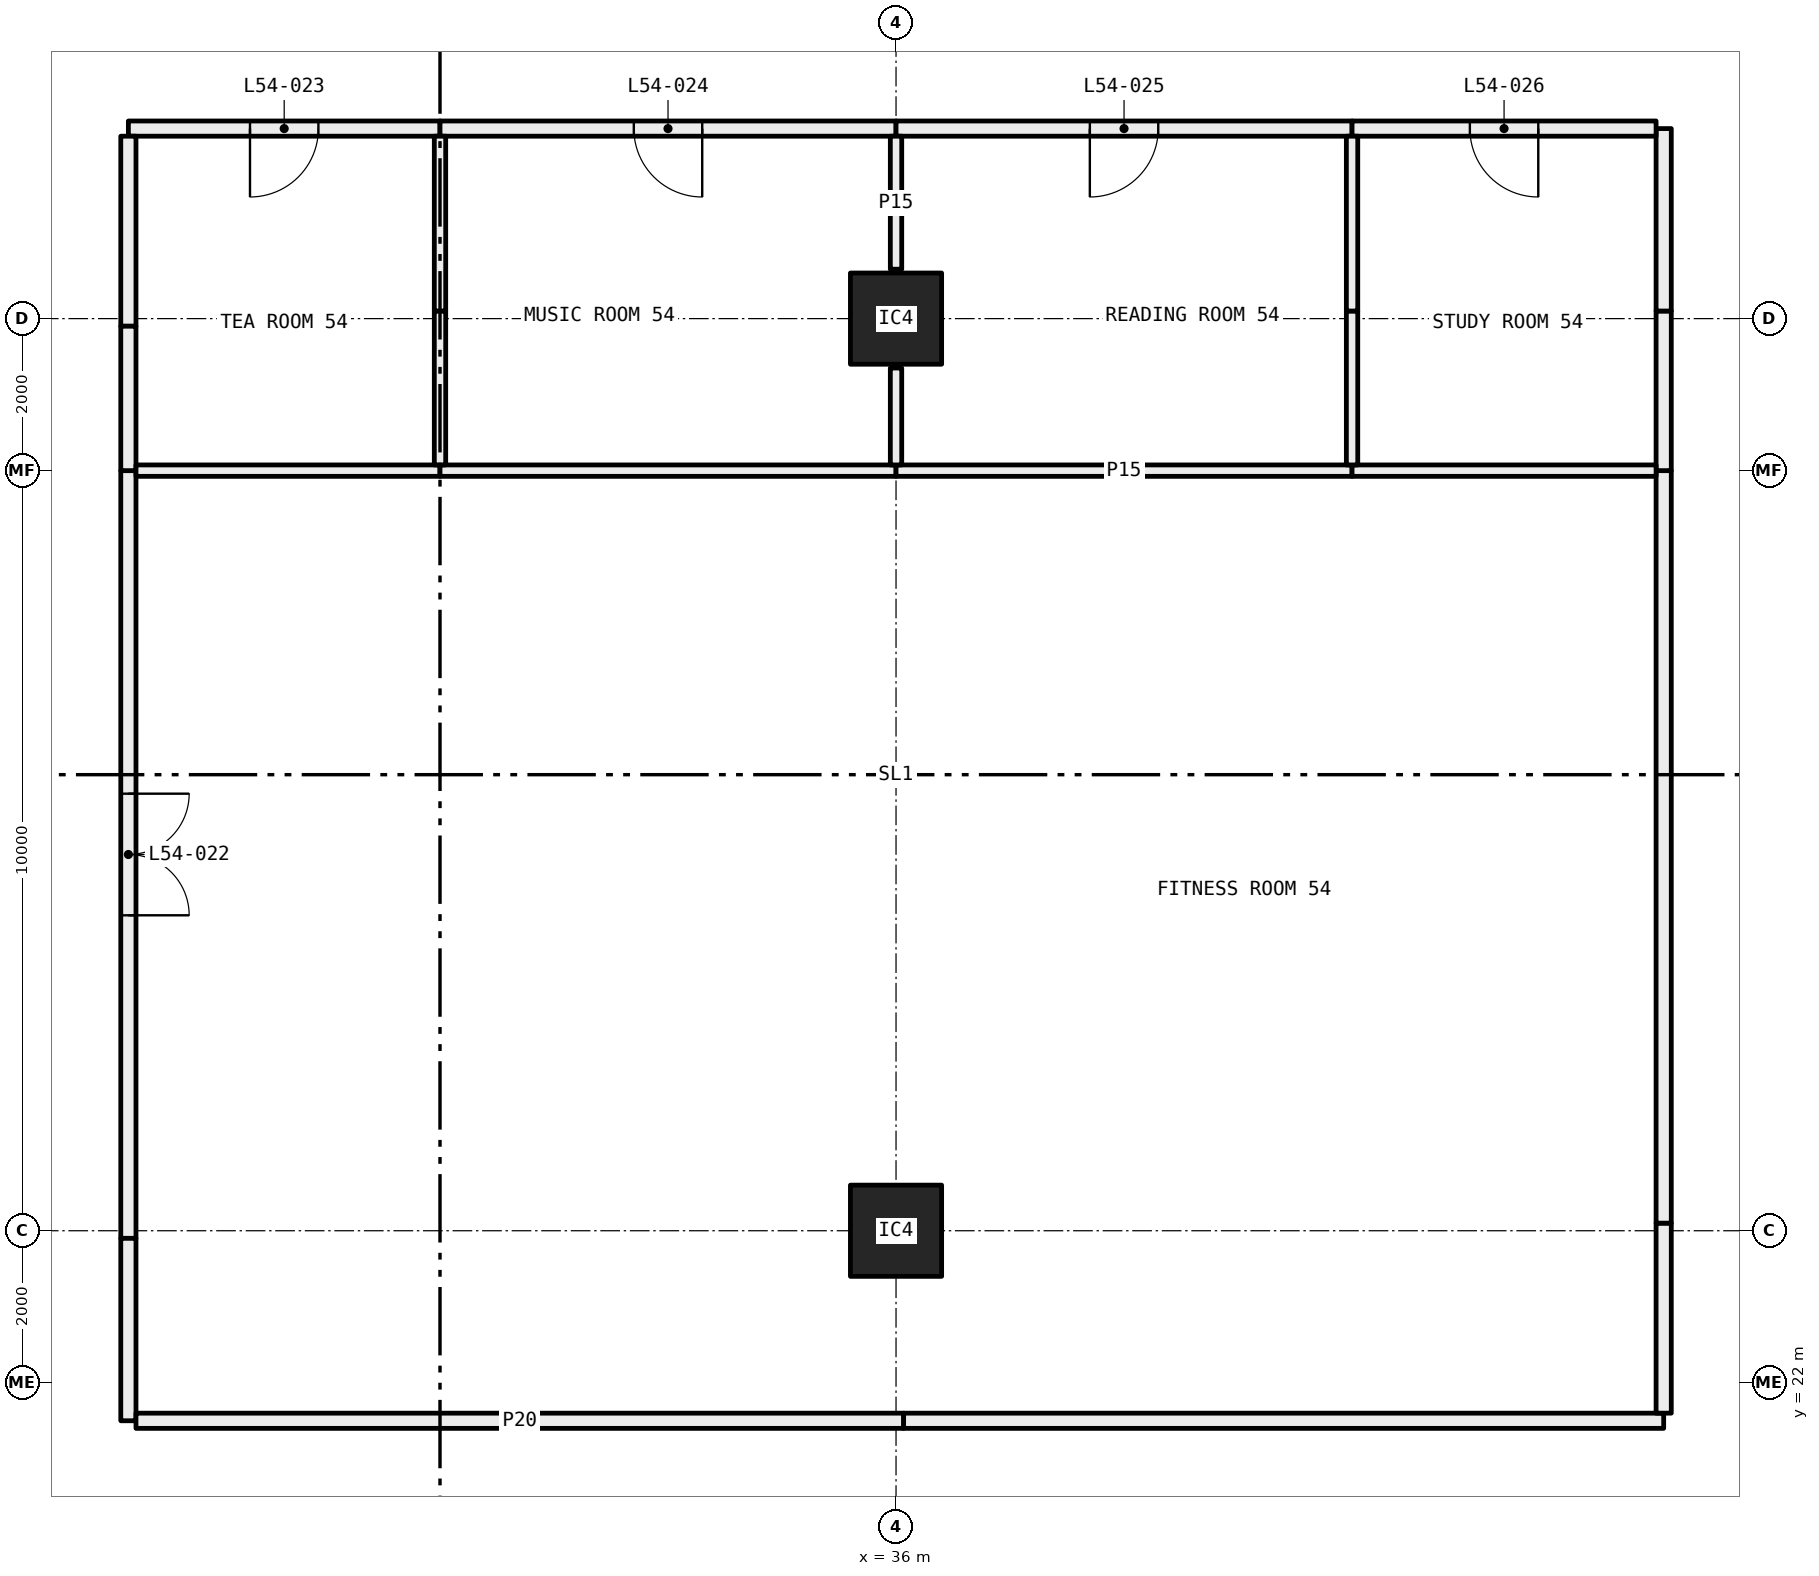
"""IFC4 building model, lengths in metres.
Left out: names, types, materials, properties, quantities, classifications, styles, units other than length and angle.
Written with IfcOpenShell. Run it as: python <this file> out.ifc"""

import sys

from ifc_helpers import new_model, si_unit, direction, frame, frame_2d, origin, origin_2d, place, context, subcontext, project, spatial, rectangle, hollow_rectangle, extrude, element, fill, save


model = new_model("IFC4")
c1 = context("Model", 3, precision=1e-05, world=origin(), true_north=direction((0.0, 1.0)))
c2 = subcontext(c1, "Body", "Model", "MODEL_VIEW")
j1 = project(units=[si_unit("LENGTHUNIT", "METRE"), si_unit("PLANEANGLEUNIT", "RADIAN")], contexts=[c1])
p1 = place(None, origin())
s1 = spatial("IfcSite", under=j1, at=p1, CompositionType="ELEMENT")
p2 = place(p1, origin())
s2 = spatial("IfcBuilding", under=s1, at=p2, CompositionType="ELEMENT")
p3 = place(p2, frame((0.0, 0.0, 203.1)))
s3 = spatial("IfcBuildingStorey", under=s2, at=p3, CompositionType="ELEMENT", Elevation=203.1)
for number, where, z_axis, x_axis in (
    (1, (36.0, 24.0, 0.0), (0.0, 0.0, 1.0), (1.0, 0.0, 0.0)),
    (2, (36.0, 36.0, 0.0), (0.0, 0.0, 1.0), (1.0, 0.0, 0.0)),
):
    element("IfcColumn", number, at=place(p3, frame(where, z_axis=z_axis, x_axis=x_axis)), inside=s3, PredefinedType="COLUMN", context=c2, shape_type="SweptSolid", body=[
        extrude(hollow_rectangle(XDim=1.2, YDim=1.2, WallThickness=0.05, at=origin_2d()), origin(), (0.0, 0.0, 1.0), 3.05),
    ])
p4 = place(p3, frame((25.9, 34.0, 0.0), z_axis=(0.0, 0.0, 1.0), x_axis=(0.0, -1.0, 0.0)))
e3 = element("IfcWall", 3, at=p4, inside=s3, PredefinedType="PARTITIONING", context=c2, shape_type="SweptSolid", body=[
    extrude(rectangle(XDim=10.1, YDim=0.2, at=frame_2d((5.05, 0.0))), origin(), (0.0, 0.0, 1.0), 2.45),
])
p5 = place(p4, frame((4.25, 0.0, 0.0)))
e4 = element("IfcOpeningElement", 4, at=p5, cuts=e3, PredefinedType="OPENING", context=c2, shape_type="SweptSolid", body=[
    extrude(rectangle(XDim=1.6, YDim=2.1, at=frame_2d((0.8, 1.05))), frame((0.0, 0.11, 0.0), z_axis=(0.0, -1.0, 0.0), x_axis=(1.0, 0.0, 0.0)), (0.0, 0.0, 1.0), 0.22),
])
p6 = place(p3, frame((25.9, 23.9, 0.0), z_axis=(0.0, 0.0, 1.0), x_axis=(0.0, -1.0, 0.0)))
e5 = element("IfcWall", 5, at=p6, inside=s3, PredefinedType="PARTITIONING", context=c2, shape_type="SweptSolid", body=[
    extrude(rectangle(XDim=2.4, YDim=0.2, at=frame_2d((1.2, 0.0))), origin(), (0.0, 0.0, 1.0), 3.05),
])
p7 = place(p3, frame((26.0, 21.5, 0.0), z_axis=(0.0, 0.0, 1.0), x_axis=(1.0, 0.0, 0.0)))
e6 = element("IfcWall", 6, at=p7, inside=s3, PredefinedType="PARTITIONING", context=c2, shape_type="SweptSolid", body=[
    extrude(rectangle(XDim=10.1, YDim=0.2, at=frame_2d((5.05, 0.0))), origin(), (0.0, 0.0, 1.0), 2.45),
])
p8 = place(p3, frame((36.1, 21.5, 0.0), z_axis=(0.0, 0.0, 1.0), x_axis=(1.0, 0.0, 0.0)))
e7 = element("IfcWall", 7, at=p8, inside=s3, PredefinedType="PARTITIONING", context=c2, shape_type="SweptSolid", body=[
    extrude(rectangle(XDim=10.0, YDim=0.2, at=frame_2d((5.0, 0.0))), origin(), (0.0, 0.0, 1.0), 3.05),
])
p9 = place(p3, frame((46.1, 21.6, 0.0), z_axis=(0.0, 0.0, 1.0), x_axis=(0.0, 1.0, 0.0)))
e8 = element("IfcWall", 8, at=p9, inside=s3, PredefinedType="PARTITIONING", context=c2, shape_type="SweptSolid", body=[
    extrude(rectangle(XDim=2.5, YDim=0.2, at=frame_2d((1.25, 0.0))), origin(), (0.0, 0.0, 1.0), 2.45),
])
p10 = place(p3, frame((46.1, 24.1, 0.0), z_axis=(0.0, 0.0, 1.0), x_axis=(0.0, 1.0, 0.0)))
e9 = element("IfcWall", 9, at=p10, inside=s3, PredefinedType="PARTITIONING", context=c2, shape_type="SweptSolid", body=[
    extrude(rectangle(XDim=9.9, YDim=0.2, at=frame_2d((4.95, 0.0))), origin(), (0.0, 0.0, 1.0), 3.05),
])
p11 = place(p3, frame((30.0, 38.5, 0.0), z_axis=(0.0, 0.0, 1.0), x_axis=(-1.0, 0.0, 0.0)))
e10 = element("IfcWall", 10, at=p11, inside=s3, PredefinedType="PARTITIONING", context=c2, shape_type="SweptSolid", body=[
    extrude(rectangle(XDim=4.1, YDim=0.2, at=frame_2d((2.05, 0.0))), origin(), (0.0, 0.0, 1.0), 3.05),
])
p12 = place(p11, frame((1.6, 0.0, 0.0)))
e11 = element("IfcOpeningElement", 11, at=p12, cuts=e10, PredefinedType="OPENING", context=c2, shape_type="SweptSolid", body=[
    extrude(rectangle(XDim=0.9, YDim=2.1, at=frame_2d((0.45, 1.05))), frame((0.0, 0.11, 0.0), z_axis=(0.0, -1.0, 0.0), x_axis=(1.0, 0.0, 0.0)), (0.0, 0.0, 1.0), 0.22),
])
p13 = place(p3, frame((25.9, 38.4, 0.0), z_axis=(0.0, 0.0, 1.0), x_axis=(0.0, -1.0, 0.0)))
e12 = element("IfcWall", 12, at=p13, inside=s3, PredefinedType="PARTITIONING", context=c2, shape_type="SweptSolid", body=[
    extrude(rectangle(XDim=2.5, YDim=0.2, at=frame_2d((1.25, 0.0))), origin(), (0.0, 0.0, 1.0), 2.45),
])
p14 = place(p3, frame((25.9, 35.9, 0.0), z_axis=(0.0, 0.0, 1.0), x_axis=(0.0, -1.0, 0.0)))
e13 = element("IfcWall", 13, at=p14, inside=s3, PredefinedType="PARTITIONING", context=c2, shape_type="SweptSolid", body=[
    extrude(rectangle(XDim=1.9, YDim=0.2, at=frame_2d((0.95, 0.0))), origin(), (0.0, 0.0, 1.0), 3.05),
])
p15 = place(p3, frame((36.0, 38.5, 0.0), z_axis=(0.0, 0.0, 1.0), x_axis=(-1.0, 0.0, 0.0)))
e14 = element("IfcWall", 14, at=p15, inside=s3, PredefinedType="PARTITIONING", context=c2, shape_type="SweptSolid", body=[
    extrude(rectangle(XDim=6.0, YDim=0.2, at=frame_2d((3.0, 0.0))), origin(), (0.0, 0.0, 1.0), 2.45),
])
p16 = place(p15, frame((2.55, 0.0, 0.0)))
e15 = element("IfcOpeningElement", 15, at=p16, cuts=e14, PredefinedType="OPENING", context=c2, shape_type="SweptSolid", body=[
    extrude(rectangle(XDim=0.9, YDim=2.1, at=frame_2d((0.45, 1.05))), frame((0.0, 0.11, 0.0), z_axis=(0.0, -1.0, 0.0), x_axis=(1.0, 0.0, 0.0)), (0.0, 0.0, 1.0), 0.22),
])
p17 = place(p3, frame((42.0, 38.5, 0.0), z_axis=(0.0, 0.0, 1.0), x_axis=(-1.0, 0.0, 0.0)))
e16 = element("IfcWall", 16, at=p17, inside=s3, PredefinedType="PARTITIONING", context=c2, shape_type="SweptSolid", body=[
    extrude(rectangle(XDim=6.0, YDim=0.2, at=frame_2d((3.0, 0.0))), origin(), (0.0, 0.0, 1.0), 2.45),
])
p18 = place(p17, frame((2.55, 0.0, 0.0)))
e17 = element("IfcOpeningElement", 17, at=p18, cuts=e16, PredefinedType="OPENING", context=c2, shape_type="SweptSolid", body=[
    extrude(rectangle(XDim=0.9, YDim=2.1, at=frame_2d((0.45, 1.05))), frame((0.0, 0.11, 0.0), z_axis=(0.0, -1.0, 0.0), x_axis=(1.0, 0.0, 0.0)), (0.0, 0.0, 1.0), 0.22),
])
p19 = place(p3, frame((46.1, 34.0, 0.0), z_axis=(0.0, 0.0, 1.0), x_axis=(0.0, 1.0, 0.0)))
e18 = element("IfcWall", 18, at=p19, inside=s3, PredefinedType="PARTITIONING", context=c2, shape_type="SweptSolid", body=[
    extrude(rectangle(XDim=2.1, YDim=0.2, at=frame_2d((1.05, 0.0))), origin(), (0.0, 0.0, 1.0), 2.45),
])
p20 = place(p3, frame((46.1, 36.1, 0.0), z_axis=(0.0, 0.0, 1.0), x_axis=(0.0, 1.0, 0.0)))
e19 = element("IfcWall", 19, at=p20, inside=s3, PredefinedType="PARTITIONING", context=c2, shape_type="SweptSolid", body=[
    extrude(rectangle(XDim=2.4, YDim=0.2, at=frame_2d((1.2, 0.0))), origin(), (0.0, 0.0, 1.0), 3.05),
])
p21 = place(p3, frame((46.0, 38.5, 0.0), z_axis=(0.0, 0.0, 1.0), x_axis=(-1.0, 0.0, 0.0)))
e20 = element("IfcWall", 20, at=p21, inside=s3, PredefinedType="PARTITIONING", context=c2, shape_type="SweptSolid", body=[
    extrude(rectangle(XDim=4.0, YDim=0.2, at=frame_2d((2.0, 0.0))), origin(), (0.0, 0.0, 1.0), 3.05),
])
p22 = place(p21, frame((1.55, 0.0, 0.0)))
e21 = element("IfcOpeningElement", 21, at=p22, cuts=e20, PredefinedType="OPENING", context=c2, shape_type="SweptSolid", body=[
    extrude(rectangle(XDim=0.9, YDim=2.1, at=frame_2d((0.45, 1.05))), frame((0.0, 0.11, 0.0), z_axis=(0.0, -1.0, 0.0), x_axis=(1.0, 0.0, 0.0)), (0.0, 0.0, 1.0), 0.22),
])
p23 = place(p3, frame((30.0, 34.0, 0.0), z_axis=(0.0, 0.0, 1.0), x_axis=(-1.0, 0.0, 0.0)))
e22 = element("IfcWall", 22, at=p23, inside=s3, PredefinedType="PARTITIONING", context=c2, shape_type="SweptSolid", body=[
    extrude(rectangle(XDim=4.0, YDim=0.15, at=frame_2d((2.0, 0.0))), origin(), (0.0, 0.0, 1.0), 3.05),
])
for number, where, z_axis, x_axis in (
    (23, (36.0, 34.0, 0.0), (0.0, 0.0, 1.0), (-1.0, 0.0, 0.0)),
    (24, (42.0, 34.0, 0.0), (0.0, 0.0, 1.0), (-1.0, 0.0, 0.0)),
):
    element("IfcWall", number, at=place(p3, frame(where, z_axis=z_axis, x_axis=x_axis)), inside=s3, PredefinedType="PARTITIONING", context=c2, shape_type="SweptSolid", body=[
        extrude(rectangle(XDim=6.0, YDim=0.15, at=frame_2d((3.0, 0.0))), origin(), (0.0, 0.0, 1.0), 2.45),
    ])
p24 = place(p3, frame((46.0, 34.0, 0.0), z_axis=(0.0, 0.0, 1.0), x_axis=(-1.0, 0.0, 0.0)))
e25 = element("IfcWall", 25, at=p24, inside=s3, PredefinedType="PARTITIONING", context=c2, shape_type="SweptSolid", body=[
    extrude(rectangle(XDim=4.0, YDim=0.15, at=frame_2d((2.0, 0.0))), origin(), (0.0, 0.0, 1.0), 3.05),
])
p25 = place(p3, frame((30.0, 34.075, 0.0), z_axis=(0.0, 0.0, 1.0), x_axis=(0.0, 1.0, 0.0)))
e26 = element("IfcWall", 26, at=p25, inside=s3, PredefinedType="PARTITIONING", context=c2, shape_type="SweptSolid", body=[
    extrude(rectangle(XDim=2.025, YDim=0.15, at=frame_2d((1.013, 0.0))), origin(), (0.0, 0.0, 1.0), 2.45),
])
p26 = place(p3, frame((30.0, 36.1, 0.0), z_axis=(0.0, 0.0, 1.0), x_axis=(0.0, 1.0, 0.0)))
e27 = element("IfcWall", 27, at=p26, inside=s3, PredefinedType="PARTITIONING", context=c2, shape_type="SweptSolid", body=[
    extrude(rectangle(XDim=2.3, YDim=0.15, at=frame_2d((1.15, 0.0))), origin(), (0.0, 0.0, 1.0), 3.05),
])
p27 = place(p3, frame((36.0, 34.075, 0.0), z_axis=(0.0, 0.0, 1.0), x_axis=(0.0, 1.0, 0.0)))
e28 = element("IfcWall", 28, at=p27, inside=s3, PredefinedType="PARTITIONING", context=c2, shape_type="SweptSolid", body=[
    extrude(rectangle(XDim=1.275, YDim=0.15, at=frame_2d((0.638, 0.0))), origin(), (0.0, 0.0, 1.0), 2.45),
])
p28 = place(p3, frame((36.0, 36.65, 0.0), z_axis=(0.0, 0.0, 1.0), x_axis=(0.0, 1.0, 0.0)))
e29 = element("IfcWall", 29, at=p28, inside=s3, PredefinedType="PARTITIONING", context=c2, shape_type="SweptSolid", body=[
    extrude(rectangle(XDim=1.75, YDim=0.15, at=frame_2d((0.875, 0.0))), origin(), (0.0, 0.0, 1.0), 2.45),
])
p29 = place(p3, frame((42.0, 34.075, 0.0), z_axis=(0.0, 0.0, 1.0), x_axis=(0.0, 1.0, 0.0)))
e30 = element("IfcWall", 30, at=p29, inside=s3, PredefinedType="PARTITIONING", context=c2, shape_type="SweptSolid", body=[
    extrude(rectangle(XDim=2.025, YDim=0.15, at=frame_2d((1.013, 0.0))), origin(), (0.0, 0.0, 1.0), 2.45),
])
p30 = place(p3, frame((42.0, 36.1, 0.0), z_axis=(0.0, 0.0, 1.0), x_axis=(0.0, 1.0, 0.0)))
e31 = element("IfcWall", 31, at=p30, inside=s3, PredefinedType="PARTITIONING", context=c2, shape_type="SweptSolid", body=[
    extrude(rectangle(XDim=2.3, YDim=0.15, at=frame_2d((1.15, 0.0))), origin(), (0.0, 0.0, 1.0), 3.05),
])
p31 = place(p5, origin())
e32 = element("IfcDoor", 32, at=p31, inside=s3, OperationType="DOUBLE_DOOR_SINGLE_SWING", PredefinedType="DOOR", context=c2, shape_type="SweptSolid", body=[
    extrude(rectangle(XDim=1.6, YDim=2.1, at=frame_2d((0.8, 1.05))), frame((0.0, 0.025, 0.0), z_axis=(0.0, -1.0, 0.0), x_axis=(1.0, 0.0, 0.0)), (0.0, 0.0, 1.0), 0.05),
])
fill(e4, e32)
p32 = place(p12, origin())
e33 = element("IfcDoor", 33, at=p32, inside=s3, OperationType="SINGLE_SWING_LEFT", PredefinedType="DOOR", context=c2, shape_type="SweptSolid", body=[
    extrude(rectangle(XDim=0.9, YDim=2.1, at=frame_2d((0.45, 1.05))), frame((0.0, 0.025, 0.0), z_axis=(0.0, -1.0, 0.0), x_axis=(1.0, 0.0, 0.0)), (0.0, 0.0, 1.0), 0.05),
])
fill(e11, e33)
p33 = place(p16, origin())
e34 = element("IfcDoor", 34, at=p33, inside=s3, OperationType="SINGLE_SWING_RIGHT", PredefinedType="DOOR", context=c2, shape_type="SweptSolid", body=[
    extrude(rectangle(XDim=0.9, YDim=2.1, at=frame_2d((0.45, 1.05))), frame((0.0, 0.025, 0.0), z_axis=(0.0, -1.0, 0.0), x_axis=(1.0, 0.0, 0.0)), (0.0, 0.0, 1.0), 0.05),
])
fill(e15, e34)
p34 = place(p18, origin())
e35 = element("IfcDoor", 35, at=p34, inside=s3, OperationType="SINGLE_SWING_LEFT", PredefinedType="DOOR", context=c2, shape_type="SweptSolid", body=[
    extrude(rectangle(XDim=0.9, YDim=2.1, at=frame_2d((0.45, 1.05))), frame((0.0, 0.025, 0.0), z_axis=(0.0, -1.0, 0.0), x_axis=(1.0, 0.0, 0.0)), (0.0, 0.0, 1.0), 0.05),
])
fill(e17, e35)
p35 = place(p22, origin())
e36 = element("IfcDoor", 36, at=p35, inside=s3, OperationType="SINGLE_SWING_RIGHT", PredefinedType="DOOR", context=c2, shape_type="SweptSolid", body=[
    extrude(rectangle(XDim=0.9, YDim=2.1, at=frame_2d((0.45, 1.05))), frame((0.0, 0.025, 0.0), z_axis=(0.0, -1.0, 0.0), x_axis=(1.0, 0.0, 0.0)), (0.0, 0.0, 1.0), 0.05),
])
fill(e21, e36)
save(model, sys.argv[1])
